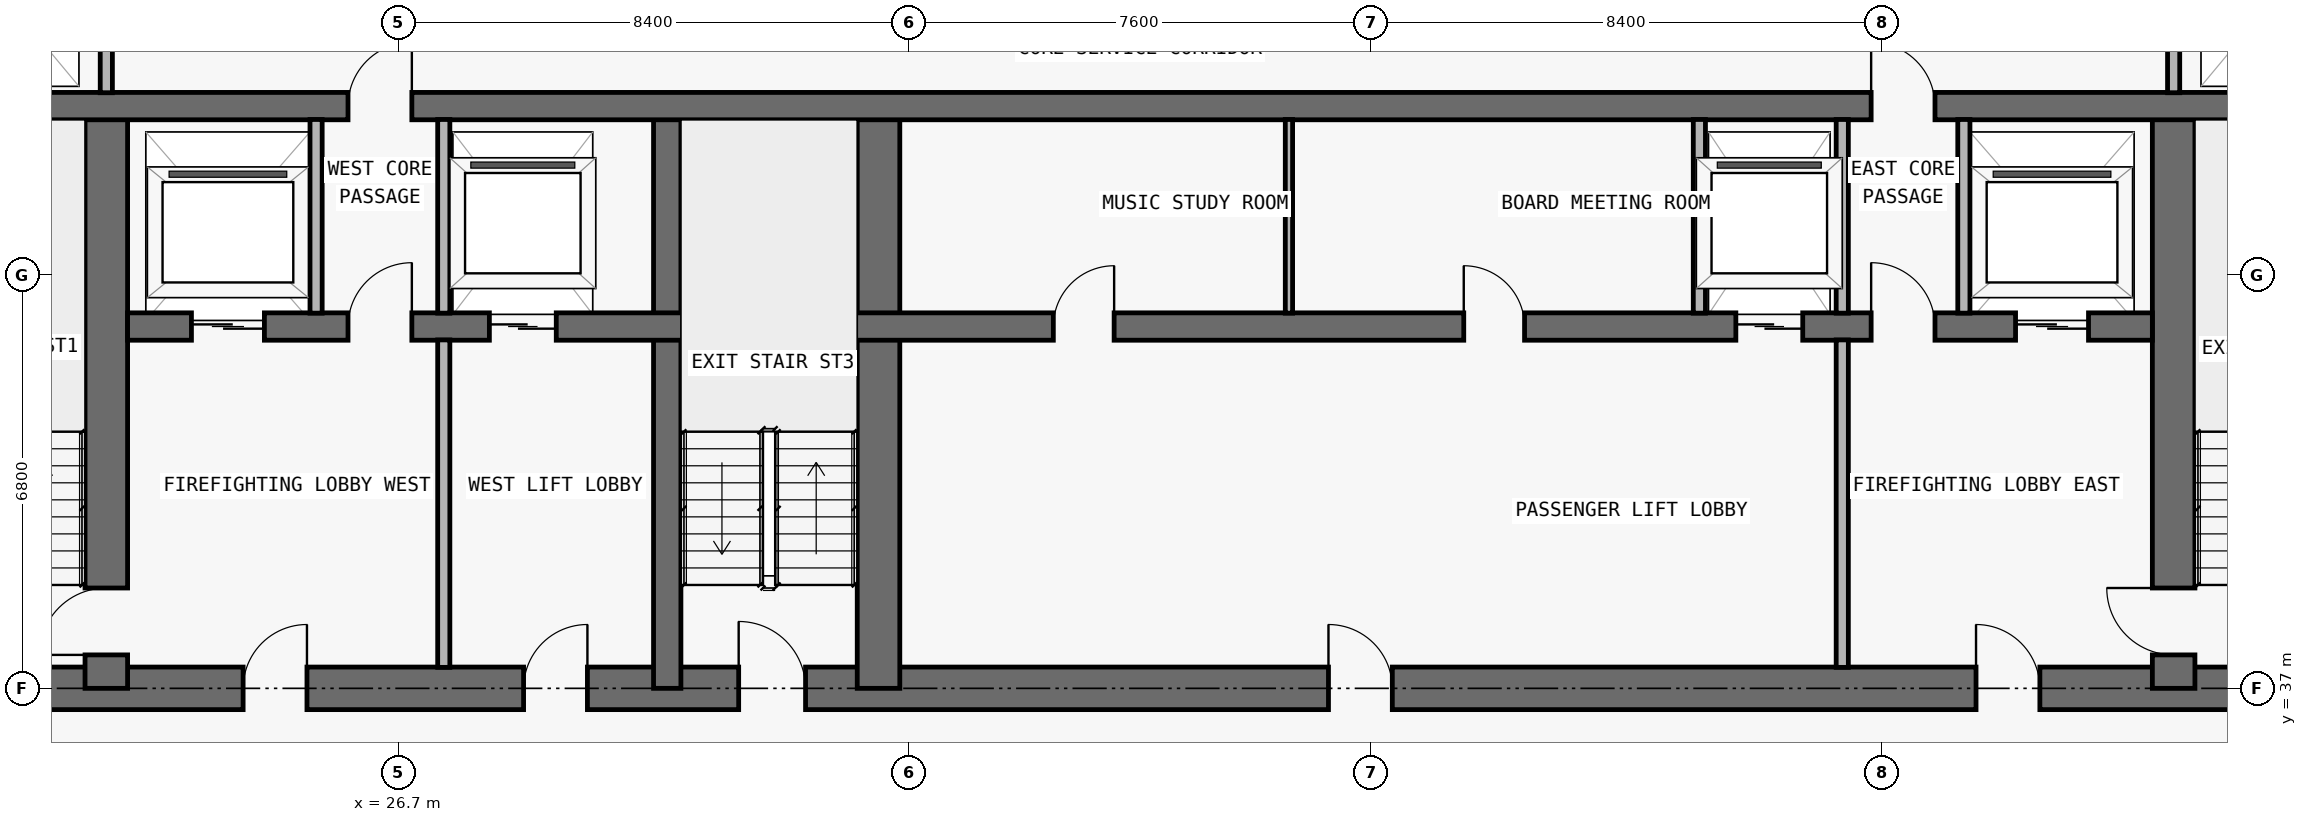
"""IFC4 building model, lengths in metres.
Left out: names, types, materials, properties, quantities, classifications, styles, units other than length and angle.
Written with IfcOpenShell. Run it as: python <this file> out.ifc"""

import sys

from ifc_helpers import new_model, si_unit, direction, frame, frame_2d, origin, place, context, subcontext, project, spatial, rectangle, extrude, element, fill, save


model = new_model("IFC4")
c1 = context("Model", 3, precision=1e-05, world=origin(), true_north=direction((0.0, 1.0)))
c2 = subcontext(c1, "Body", "Model", "MODEL_VIEW")
j1 = project(units=[si_unit("LENGTHUNIT", "METRE"), si_unit("PLANEANGLEUNIT", "RADIAN")], contexts=[c1])
p1 = place(None, origin())
s1 = spatial("IfcSite", under=j1, at=p1, CompositionType="ELEMENT")
p2 = place(p1, origin())
s2 = spatial("IfcBuilding", under=s1, at=p2, CompositionType="ELEMENT")
p3 = place(p2, frame((0.0, 0.0, 191.7)))
s3 = spatial("IfcBuildingStorey", under=s2, at=p3, CompositionType="ELEMENT", Elevation=191.7)
p4 = place(p3, frame((17.95, 37.0, 0.0), z_axis=(0.0, 0.0, 1.0), x_axis=(1.0, 0.0, 0.0)))
e1 = element("IfcWall", 1, at=p4, inside=s3, PredefinedType="SHEAR", context=c2, shape_type="SweptSolid", body=[
    extrude(rectangle(XDim=41.9, YDim=0.7, at=frame_2d((20.95, 0.0))), origin(), (0.0, 0.0, 1.0), 3.05),
])
p5 = place(p4, frame((14.35, 0.0, 0.0)))
e2 = element("IfcOpeningElement", 2, at=p5, cuts=e1, PredefinedType="OPENING", context=c2, shape_type="SweptSolid", body=[
    extrude(rectangle(XDim=1.1, YDim=2.15, at=frame_2d((0.55, 1.075))), frame((0.0, 0.36, 0.0), z_axis=(0.0, -1.0, 0.0), x_axis=(1.0, 0.0, 0.0)), (0.0, 0.0, 1.0), 0.72),
])
p6 = place(p4, frame((6.2, 0.0, 0.0)))
e3 = element("IfcOpeningElement", 3, at=p6, cuts=e1, PredefinedType="OPENING", context=c2, shape_type="SweptSolid", body=[
    extrude(rectangle(XDim=1.05, YDim=2.15, at=frame_2d((0.525, 1.075))), frame((0.0, 0.36, 0.0), z_axis=(0.0, -1.0, 0.0), x_axis=(1.0, 0.0, 0.0)), (0.0, 0.0, 1.0), 0.72),
])
p7 = place(p4, frame((34.7, 0.0, 0.0)))
e4 = element("IfcOpeningElement", 4, at=p7, cuts=e1, PredefinedType="OPENING", context=c2, shape_type="SweptSolid", body=[
    extrude(rectangle(XDim=1.05, YDim=2.15, at=frame_2d((0.525, 1.075))), frame((0.0, 0.36, 0.0), z_axis=(0.0, -1.0, 0.0), x_axis=(1.0, 0.0, 0.0)), (0.0, 0.0, 1.0), 0.72),
])
p8 = place(p4, frame((10.812, 0.0, 0.0)))
e5 = element("IfcOpeningElement", 5, at=p8, cuts=e1, PredefinedType="OPENING", context=c2, shape_type="SweptSolid", body=[
    extrude(rectangle(XDim=1.05, YDim=2.15, at=frame_2d((0.525, 1.075))), frame((0.0, 0.36, 0.0), z_axis=(0.0, -1.0, 0.0), x_axis=(1.0, 0.0, 0.0)), (0.0, 0.0, 1.0), 0.72),
])
p9 = place(p4, frame((24.05, 0.0, 0.0)))
e6 = element("IfcOpeningElement", 6, at=p9, cuts=e1, PredefinedType="OPENING", context=c2, shape_type="SweptSolid", body=[
    extrude(rectangle(XDim=1.05, YDim=2.15, at=frame_2d((0.525, 1.075))), frame((0.0, 0.36, 0.0), z_axis=(0.0, -1.0, 0.0), x_axis=(1.0, 0.0, 0.0)), (0.0, 0.0, 1.0), 0.72),
])
p10 = place(p3, frame((21.9, 37.0, 0.0), z_axis=(0.0, 0.0, 1.0), x_axis=(0.0, 1.0, 0.0)))
e7 = element("IfcWall", 7, at=p10, inside=s3, PredefinedType="SHEAR", context=c2, shape_type="SweptSolid", body=[
    extrude(rectangle(XDim=9.575, YDim=0.7, at=frame_2d((4.788, 0.0))), origin(), (0.0, 0.0, 1.0), 3.05),
])
p11 = place(p10, frame((0.55, 0.0, 0.0)))
e8 = element("IfcOpeningElement", 8, at=p11, cuts=e7, PredefinedType="OPENING", context=c2, shape_type="SweptSolid", body=[
    extrude(rectangle(XDim=1.1, YDim=2.15, at=frame_2d((0.55, 1.075))), frame((0.0, 0.36, 0.0), z_axis=(0.0, -1.0, 0.0), x_axis=(1.0, 0.0, 0.0)), (0.0, 0.0, 1.0), 0.72),
])
p12 = place(p3, frame((55.9, 37.0, 0.0), z_axis=(0.0, 0.0, 1.0), x_axis=(0.0, 1.0, 0.0)))
e9 = element("IfcWall", 9, at=p12, inside=s3, PredefinedType="SHEAR", context=c2, shape_type="SweptSolid", body=[
    extrude(rectangle(XDim=9.575, YDim=0.7, at=frame_2d((4.788, 0.0))), origin(), (0.0, 0.0, 1.0), 3.05),
])
p13 = place(p12, frame((0.55, 0.0, 0.0)))
e10 = element("IfcOpeningElement", 10, at=p13, cuts=e9, PredefinedType="OPENING", context=c2, shape_type="SweptSolid", body=[
    extrude(rectangle(XDim=1.1, YDim=2.15, at=frame_2d((0.55, 1.075))), frame((0.0, 0.36, 0.0), z_axis=(0.0, -1.0, 0.0), x_axis=(1.0, 0.0, 0.0)), (0.0, 0.0, 1.0), 0.72),
])
p14 = place(p3, frame((31.125, 37.0, 0.0), z_axis=(0.0, 0.0, 1.0), x_axis=(0.0, 1.0, 0.0)))
e11 = element("IfcWall", 11, at=p14, inside=s3, PredefinedType="SHEAR", context=c2, shape_type="SweptSolid", body=[
    extrude(rectangle(XDim=9.575, YDim=0.45, at=frame_2d((4.788, 0.0))), origin(), (0.0, 0.0, 1.0), 3.05),
])
p15 = place(p3, frame((34.6, 37.0, 0.0), z_axis=(0.0, 0.0, 1.0), x_axis=(0.0, 1.0, 0.0)))
e12 = element("IfcWall", 12, at=p15, inside=s3, PredefinedType="SHEAR", context=c2, shape_type="SweptSolid", body=[
    extrude(rectangle(XDim=9.575, YDim=0.7, at=frame_2d((4.788, 0.0))), origin(), (0.0, 0.0, 1.0), 3.05),
])
p16 = place(p3, frame((22.25, 42.95, 0.0), z_axis=(0.0, 0.0, 1.0), x_axis=(1.0, 0.0, 0.0)))
e13 = element("IfcWall", 13, at=p16, inside=s3, PredefinedType="SHEAR", context=c2, shape_type="SweptSolid", body=[
    extrude(rectangle(XDim=33.3, YDim=0.45, at=frame_2d((16.65, 0.0))), origin(), (0.0, 0.0, 1.0), 3.05),
])
p17 = place(p16, frame((1.05, 0.0, 0.0)))
e14 = element("IfcOpeningElement", 14, at=p17, cuts=e13, PredefinedType="OPENING", context=c2, shape_type="SweptSolid", body=[
    extrude(rectangle(XDim=1.2, YDim=2.2, at=frame_2d((0.6, 1.1))), frame((0.0, 0.235, 0.0), z_axis=(0.0, -1.0, 0.0), x_axis=(1.0, 0.0, 0.0)), (0.0, 0.0, 1.0), 0.47),
])
p18 = place(p16, frame((31.05, 0.0, 0.0)))
e15 = element("IfcOpeningElement", 15, at=p18, cuts=e13, PredefinedType="OPENING", context=c2, shape_type="SweptSolid", body=[
    extrude(rectangle(XDim=1.2, YDim=2.2, at=frame_2d((0.6, 1.1))), frame((0.0, 0.235, 0.0), z_axis=(0.0, -1.0, 0.0), x_axis=(1.0, 0.0, 0.0)), (0.0, 0.0, 1.0), 0.47),
])
p19 = place(p16, frame((26.45, 0.0, 0.0)))
e16 = element("IfcOpeningElement", 16, at=p19, cuts=e13, PredefinedType="OPENING", context=c2, shape_type="SweptSolid", body=[
    extrude(rectangle(XDim=1.1, YDim=2.2, at=frame_2d((0.55, 1.1))), frame((0.0, 0.235, 0.0), z_axis=(0.0, -1.0, 0.0), x_axis=(1.0, 0.0, 0.0)), (0.0, 0.0, 1.0), 0.47),
])
p20 = place(p16, frame((5.95, 0.0, 0.0)))
e17 = element("IfcOpeningElement", 17, at=p20, cuts=e13, PredefinedType="OPENING", context=c2, shape_type="SweptSolid", body=[
    extrude(rectangle(XDim=1.1, YDim=2.2, at=frame_2d((0.55, 1.1))), frame((0.0, 0.235, 0.0), z_axis=(0.0, -1.0, 0.0), x_axis=(1.0, 0.0, 0.0)), (0.0, 0.0, 1.0), 0.47),
])
p21 = place(p16, frame((3.625, 0.0, 0.0)))
e18 = element("IfcOpeningElement", 18, at=p21, cuts=e13, PredefinedType="OPENING", context=c2, shape_type="SweptSolid", body=[
    extrude(rectangle(XDim=1.05, YDim=2.15, at=frame_2d((0.525, 1.075))), frame((0.0, 0.235, 0.0), z_axis=(0.0, -1.0, 0.0), x_axis=(1.0, 0.0, 0.0)), (0.0, 0.0, 1.0), 0.47),
])
p22 = place(p16, frame((28.675, 0.0, 0.0)))
e19 = element("IfcOpeningElement", 19, at=p22, cuts=e13, PredefinedType="OPENING", context=c2, shape_type="SweptSolid", body=[
    extrude(rectangle(XDim=1.05, YDim=2.15, at=frame_2d((0.525, 1.075))), frame((0.0, 0.235, 0.0), z_axis=(0.0, -1.0, 0.0), x_axis=(1.0, 0.0, 0.0)), (0.0, 0.0, 1.0), 0.47),
])
p23 = place(p16, frame((15.225, 0.0, 0.0)))
e20 = element("IfcOpeningElement", 20, at=p23, cuts=e13, PredefinedType="OPENING", context=c2, shape_type="SweptSolid", body=[
    extrude(rectangle(XDim=1.0, YDim=2.2, at=frame_2d((0.5, 1.1))), frame((0.0, 0.235, 0.0), z_axis=(0.0, -1.0, 0.0), x_axis=(1.0, 0.0, 0.0)), (0.0, 0.0, 1.0), 0.47),
])
p24 = place(p16, frame((21.975, 0.0, 0.0)))
e21 = element("IfcOpeningElement", 21, at=p24, cuts=e13, PredefinedType="OPENING", context=c2, shape_type="SweptSolid", body=[
    extrude(rectangle(XDim=1.0, YDim=2.2, at=frame_2d((0.5, 1.1))), frame((0.0, 0.235, 0.0), z_axis=(0.0, -1.0, 0.0), x_axis=(1.0, 0.0, 0.0)), (0.0, 0.0, 1.0), 0.47),
])
p25 = place(p3, frame((18.3, 46.575, 0.0), z_axis=(0.0, 0.0, 1.0), x_axis=(1.0, 0.0, 0.0)))
e22 = element("IfcWall", 22, at=p25, inside=s3, PredefinedType="SHEAR", context=c2, shape_type="SweptSolid", body=[
    extrude(rectangle(XDim=41.2, YDim=0.45, at=frame_2d((20.6, 0.0))), origin(), (0.0, 0.0, 1.0), 3.05),
])
p26 = place(p25, frame((7.575, 0.0, 0.0)))
e23 = element("IfcOpeningElement", 23, at=p26, cuts=e22, PredefinedType="OPENING", context=c2, shape_type="SweptSolid", body=[
    extrude(rectangle(XDim=1.05, YDim=2.15, at=frame_2d((0.525, 1.075))), frame((0.0, 0.235, 0.0), z_axis=(0.0, -1.0, 0.0), x_axis=(1.0, 0.0, 0.0)), (0.0, 0.0, 1.0), 0.47),
])
p27 = place(p25, frame((32.625, 0.0, 0.0)))
e24 = element("IfcOpeningElement", 24, at=p27, cuts=e22, PredefinedType="OPENING", context=c2, shape_type="SweptSolid", body=[
    extrude(rectangle(XDim=1.05, YDim=2.15, at=frame_2d((0.525, 1.075))), frame((0.0, 0.235, 0.0), z_axis=(0.0, -1.0, 0.0), x_axis=(1.0, 0.0, 0.0)), (0.0, 0.0, 1.0), 0.47),
])
p28 = place(p3, frame((21.9, 46.795, 0.0), z_axis=(0.0, 0.0, 1.0), x_axis=(0.0, 1.0, 0.0)))
e25 = element("IfcWall", 25, at=p28, inside=s3, PredefinedType="PARTITIONING", context=c2, shape_type="SweptSolid", body=[
    extrude(rectangle(XDim=3.16, YDim=0.2, at=frame_2d((1.58, 0.0))), origin(), (0.0, 0.0, 1.0), 3.05),
])
p29 = place(p3, frame((25.35, 43.17, 0.0), z_axis=(0.0, 0.0, 1.0), x_axis=(0.0, 1.0, 0.0)))
e26 = element("IfcWall", 26, at=p29, inside=s3, PredefinedType="PARTITIONING", context=c2, shape_type="SweptSolid", body=[
    extrude(rectangle(XDim=3.185, YDim=0.2, at=frame_2d((1.593, 0.0))), origin(), (0.0, 0.0, 1.0), 3.05),
])
p30 = place(p3, frame((27.45, 37.345, 0.0), z_axis=(0.0, 0.0, 1.0), x_axis=(0.0, 1.0, 0.0)))
e27 = element("IfcWall", 27, at=p30, inside=s3, PredefinedType="PARTITIONING", context=c2, shape_type="SweptSolid", body=[
    extrude(rectangle(XDim=5.385, YDim=0.2, at=frame_2d((2.692, 0.0))), origin(), (0.0, 0.0, 1.0), 3.05),
])
p31 = place(p3, frame((27.45, 43.17, 0.0), z_axis=(0.0, 0.0, 1.0), x_axis=(0.0, 1.0, 0.0)))
e28 = element("IfcWall", 28, at=p31, inside=s3, PredefinedType="PARTITIONING", context=c2, shape_type="SweptSolid", body=[
    extrude(rectangle(XDim=3.185, YDim=0.2, at=frame_2d((1.593, 0.0))), origin(), (0.0, 0.0, 1.0), 3.05),
])
p32 = place(p3, frame((41.35, 43.17, 0.0), z_axis=(0.0, 0.0, 1.0), x_axis=(0.0, 1.0, 0.0)))
e29 = element("IfcWall", 29, at=p32, inside=s3, PredefinedType="PARTITIONING", context=c2, shape_type="SweptSolid", body=[
    extrude(rectangle(XDim=3.185, YDim=0.12, at=frame_2d((1.593, 0.0))), origin(), (0.0, 0.0, 1.0), 3.05),
])
p33 = place(p3, frame((48.1, 43.17, 0.0), z_axis=(0.0, 0.0, 1.0), x_axis=(0.0, 1.0, 0.0)))
e30 = element("IfcWall", 30, at=p33, inside=s3, PredefinedType="PARTITIONING", context=c2, shape_type="SweptSolid", body=[
    extrude(rectangle(XDim=3.185, YDim=0.2, at=frame_2d((1.593, 0.0))), origin(), (0.0, 0.0, 1.0), 3.05),
])
p34 = place(p3, frame((50.45, 37.345, 0.0), z_axis=(0.0, 0.0, 1.0), x_axis=(0.0, 1.0, 0.0)))
e31 = element("IfcWall", 31, at=p34, inside=s3, PredefinedType="PARTITIONING", context=c2, shape_type="SweptSolid", body=[
    extrude(rectangle(XDim=5.385, YDim=0.2, at=frame_2d((2.692, 0.0))), origin(), (0.0, 0.0, 1.0), 3.05),
])
for number, where, z_axis, x_axis in (
    (32, (50.45, 43.17, 0.0), (0.0, 0.0, 1.0), (0.0, 1.0, 0.0)),
    (33, (52.45, 43.17, 0.0), (0.0, 0.0, 1.0), (0.0, 1.0, 0.0)),
):
    element("IfcWall", number, at=place(p3, frame(where, z_axis=z_axis, x_axis=x_axis)), inside=s3, PredefinedType="PARTITIONING", context=c2, shape_type="SweptSolid", body=[
        extrude(rectangle(XDim=3.185, YDim=0.2, at=frame_2d((1.593, 0.0))), origin(), (0.0, 0.0, 1.0), 3.05),
    ])
p35 = place(p3, frame((55.9, 46.795, 0.0), z_axis=(0.0, 0.0, 1.0), x_axis=(0.0, 1.0, 0.0)))
e34 = element("IfcWall", 34, at=p35, inside=s3, PredefinedType="PARTITIONING", context=c2, shape_type="SweptSolid", body=[
    extrude(rectangle(XDim=3.16, YDim=0.2, at=frame_2d((1.58, 0.0))), origin(), (0.0, 0.0, 1.0), 3.05),
])
p36 = place(p17, origin())
e35 = element("IfcDoor", 35, at=p36, inside=s3, OperationType="DOUBLE_DOOR_SLIDING", PredefinedType="DOOR", context=c2, shape_type="SweptSolid", body=[
    extrude(rectangle(XDim=1.2, YDim=2.2, at=frame_2d((0.6, 1.1))), frame((0.0, 0.025, 0.0), z_axis=(0.0, -1.0, 0.0), x_axis=(1.0, 0.0, 0.0)), (0.0, 0.0, 1.0), 0.05),
])
fill(e14, e35)
p37 = place(p18, origin())
e36 = element("IfcDoor", 36, at=p37, inside=s3, OperationType="DOUBLE_DOOR_SLIDING", PredefinedType="DOOR", context=c2, shape_type="SweptSolid", body=[
    extrude(rectangle(XDim=1.2, YDim=2.2, at=frame_2d((0.6, 1.1))), frame((0.0, 0.025, 0.0), z_axis=(0.0, -1.0, 0.0), x_axis=(1.0, 0.0, 0.0)), (0.0, 0.0, 1.0), 0.05),
])
fill(e15, e36)
p38 = place(p19, origin())
e37 = element("IfcDoor", 37, at=p38, inside=s3, OperationType="DOUBLE_DOOR_SLIDING", PredefinedType="DOOR", context=c2, shape_type="SweptSolid", body=[
    extrude(rectangle(XDim=1.1, YDim=2.2, at=frame_2d((0.55, 1.1))), frame((0.0, 0.025, 0.0), z_axis=(0.0, -1.0, 0.0), x_axis=(1.0, 0.0, 0.0)), (0.0, 0.0, 1.0), 0.05),
])
fill(e16, e37)
p39 = place(p20, origin())
e38 = element("IfcDoor", 38, at=p39, inside=s3, OperationType="DOUBLE_DOOR_SLIDING", PredefinedType="DOOR", context=c2, shape_type="SweptSolid", body=[
    extrude(rectangle(XDim=1.1, YDim=2.2, at=frame_2d((0.55, 1.1))), frame((0.0, 0.025, 0.0), z_axis=(0.0, -1.0, 0.0), x_axis=(1.0, 0.0, 0.0)), (0.0, 0.0, 1.0), 0.05),
])
fill(e17, e38)
p40 = place(p5, origin())
e39 = element("IfcDoor", 39, at=p40, inside=s3, OperationType="SINGLE_SWING_LEFT", PredefinedType="DOOR", context=c2, shape_type="SweptSolid", body=[
    extrude(rectangle(XDim=1.1, YDim=2.15, at=frame_2d((0.55, 1.075))), frame((0.0, 0.025, 0.0), z_axis=(0.0, -1.0, 0.0), x_axis=(1.0, 0.0, 0.0)), (0.0, 0.0, 1.0), 0.05),
])
fill(e2, e39)
p41 = place(p6, origin())
e40 = element("IfcDoor", 40, at=p41, inside=s3, OperationType="SINGLE_SWING_RIGHT", PredefinedType="DOOR", context=c2, shape_type="SweptSolid", body=[
    extrude(rectangle(XDim=1.05, YDim=2.15, at=frame_2d((0.525, 1.075))), frame((0.0, 0.025, 0.0), z_axis=(0.0, -1.0, 0.0), x_axis=(1.0, 0.0, 0.0)), (0.0, 0.0, 1.0), 0.05),
])
fill(e3, e40)
p42 = place(p11, origin())
e41 = element("IfcDoor", 41, at=p42, inside=s3, OperationType="SINGLE_SWING_LEFT", PredefinedType="DOOR", context=c2, shape_type="SweptSolid", body=[
    extrude(rectangle(XDim=1.1, YDim=2.15, at=frame_2d((0.55, 1.075))), frame((0.0, 0.025, 0.0), z_axis=(0.0, -1.0, 0.0), x_axis=(1.0, 0.0, 0.0)), (0.0, 0.0, 1.0), 0.05),
])
fill(e8, e41)
p43 = place(p21, origin())
e42 = element("IfcDoor", 42, at=p43, inside=s3, OperationType="SINGLE_SWING_RIGHT", PredefinedType="DOOR", context=c2, shape_type="SweptSolid", body=[
    extrude(rectangle(XDim=1.05, YDim=2.15, at=frame_2d((0.525, 1.075))), frame((0.0, 0.025, 0.0), z_axis=(0.0, -1.0, 0.0), x_axis=(1.0, 0.0, 0.0)), (0.0, 0.0, 1.0), 0.05),
])
fill(e18, e42)
p44 = place(p7, origin())
e43 = element("IfcDoor", 43, at=p44, inside=s3, OperationType="SINGLE_SWING_LEFT", PredefinedType="DOOR", context=c2, shape_type="SweptSolid", body=[
    extrude(rectangle(XDim=1.05, YDim=2.15, at=frame_2d((0.525, 1.075))), frame((0.0, 0.025, 0.0), z_axis=(0.0, -1.0, 0.0), x_axis=(1.0, 0.0, 0.0)), (0.0, 0.0, 1.0), 0.05),
])
fill(e4, e43)
p45 = place(p13, origin())
e44 = element("IfcDoor", 44, at=p45, inside=s3, OperationType="SINGLE_SWING_RIGHT", PredefinedType="DOOR", context=c2, shape_type="SweptSolid", body=[
    extrude(rectangle(XDim=1.1, YDim=2.15, at=frame_2d((0.55, 1.075))), frame((0.0, 0.025, 0.0), z_axis=(0.0, -1.0, 0.0), x_axis=(1.0, 0.0, 0.0)), (0.0, 0.0, 1.0), 0.05),
])
fill(e10, e44)
p46 = place(p22, origin())
e45 = element("IfcDoor", 45, at=p46, inside=s3, OperationType="SINGLE_SWING_LEFT", PredefinedType="DOOR", context=c2, shape_type="SweptSolid", body=[
    extrude(rectangle(XDim=1.05, YDim=2.15, at=frame_2d((0.525, 1.075))), frame((0.0, 0.025, 0.0), z_axis=(0.0, -1.0, 0.0), x_axis=(1.0, 0.0, 0.0)), (0.0, 0.0, 1.0), 0.05),
])
fill(e19, e45)
p47 = place(p8, origin())
e46 = element("IfcDoor", 46, at=p47, inside=s3, OperationType="SINGLE_SWING_RIGHT", PredefinedType="DOOR", context=c2, shape_type="SweptSolid", body=[
    extrude(rectangle(XDim=1.05, YDim=2.15, at=frame_2d((0.525, 1.075))), frame((0.0, 0.025, 0.0), z_axis=(0.0, -1.0, 0.0), x_axis=(1.0, 0.0, 0.0)), (0.0, 0.0, 1.0), 0.05),
])
fill(e5, e46)
p48 = place(p9, origin())
e47 = element("IfcDoor", 47, at=p48, inside=s3, OperationType="SINGLE_SWING_LEFT", PredefinedType="DOOR", context=c2, shape_type="SweptSolid", body=[
    extrude(rectangle(XDim=1.05, YDim=2.15, at=frame_2d((0.525, 1.075))), frame((0.0, 0.025, 0.0), z_axis=(0.0, -1.0, 0.0), x_axis=(1.0, 0.0, 0.0)), (0.0, 0.0, 1.0), 0.05),
])
fill(e6, e47)
p49 = place(p23, origin())
e48 = element("IfcDoor", 48, at=p49, inside=s3, OperationType="SINGLE_SWING_RIGHT", PredefinedType="DOOR", context=c2, shape_type="SweptSolid", body=[
    extrude(rectangle(XDim=1.0, YDim=2.2, at=frame_2d((0.5, 1.1))), frame((0.0, 0.025, 0.0), z_axis=(0.0, -1.0, 0.0), x_axis=(1.0, 0.0, 0.0)), (0.0, 0.0, 1.0), 0.05),
])
fill(e20, e48)
p50 = place(p24, origin())
e49 = element("IfcDoor", 49, at=p50, inside=s3, OperationType="SINGLE_SWING_LEFT", PredefinedType="DOOR", context=c2, shape_type="SweptSolid", body=[
    extrude(rectangle(XDim=1.0, YDim=2.2, at=frame_2d((0.5, 1.1))), frame((0.0, 0.025, 0.0), z_axis=(0.0, -1.0, 0.0), x_axis=(1.0, 0.0, 0.0)), (0.0, 0.0, 1.0), 0.05),
])
fill(e21, e49)
p51 = place(p26, origin())
e50 = element("IfcDoor", 50, at=p51, inside=s3, OperationType="SINGLE_SWING_RIGHT", PredefinedType="DOOR", context=c2, shape_type="SweptSolid", body=[
    extrude(rectangle(XDim=1.05, YDim=2.15, at=frame_2d((0.525, 1.075))), frame((0.0, 0.025, 0.0), z_axis=(0.0, -1.0, 0.0), x_axis=(1.0, 0.0, 0.0)), (0.0, 0.0, 1.0), 0.05),
])
fill(e23, e50)
p52 = place(p27, origin())
e51 = element("IfcDoor", 51, at=p52, inside=s3, OperationType="SINGLE_SWING_LEFT", PredefinedType="DOOR", context=c2, shape_type="SweptSolid", body=[
    extrude(rectangle(XDim=1.05, YDim=2.15, at=frame_2d((0.525, 1.075))), frame((0.0, 0.025, 0.0), z_axis=(0.0, -1.0, 0.0), x_axis=(1.0, 0.0, 0.0)), (0.0, 0.0, 1.0), 0.05),
])
fill(e24, e51)
save(model, sys.argv[1])
